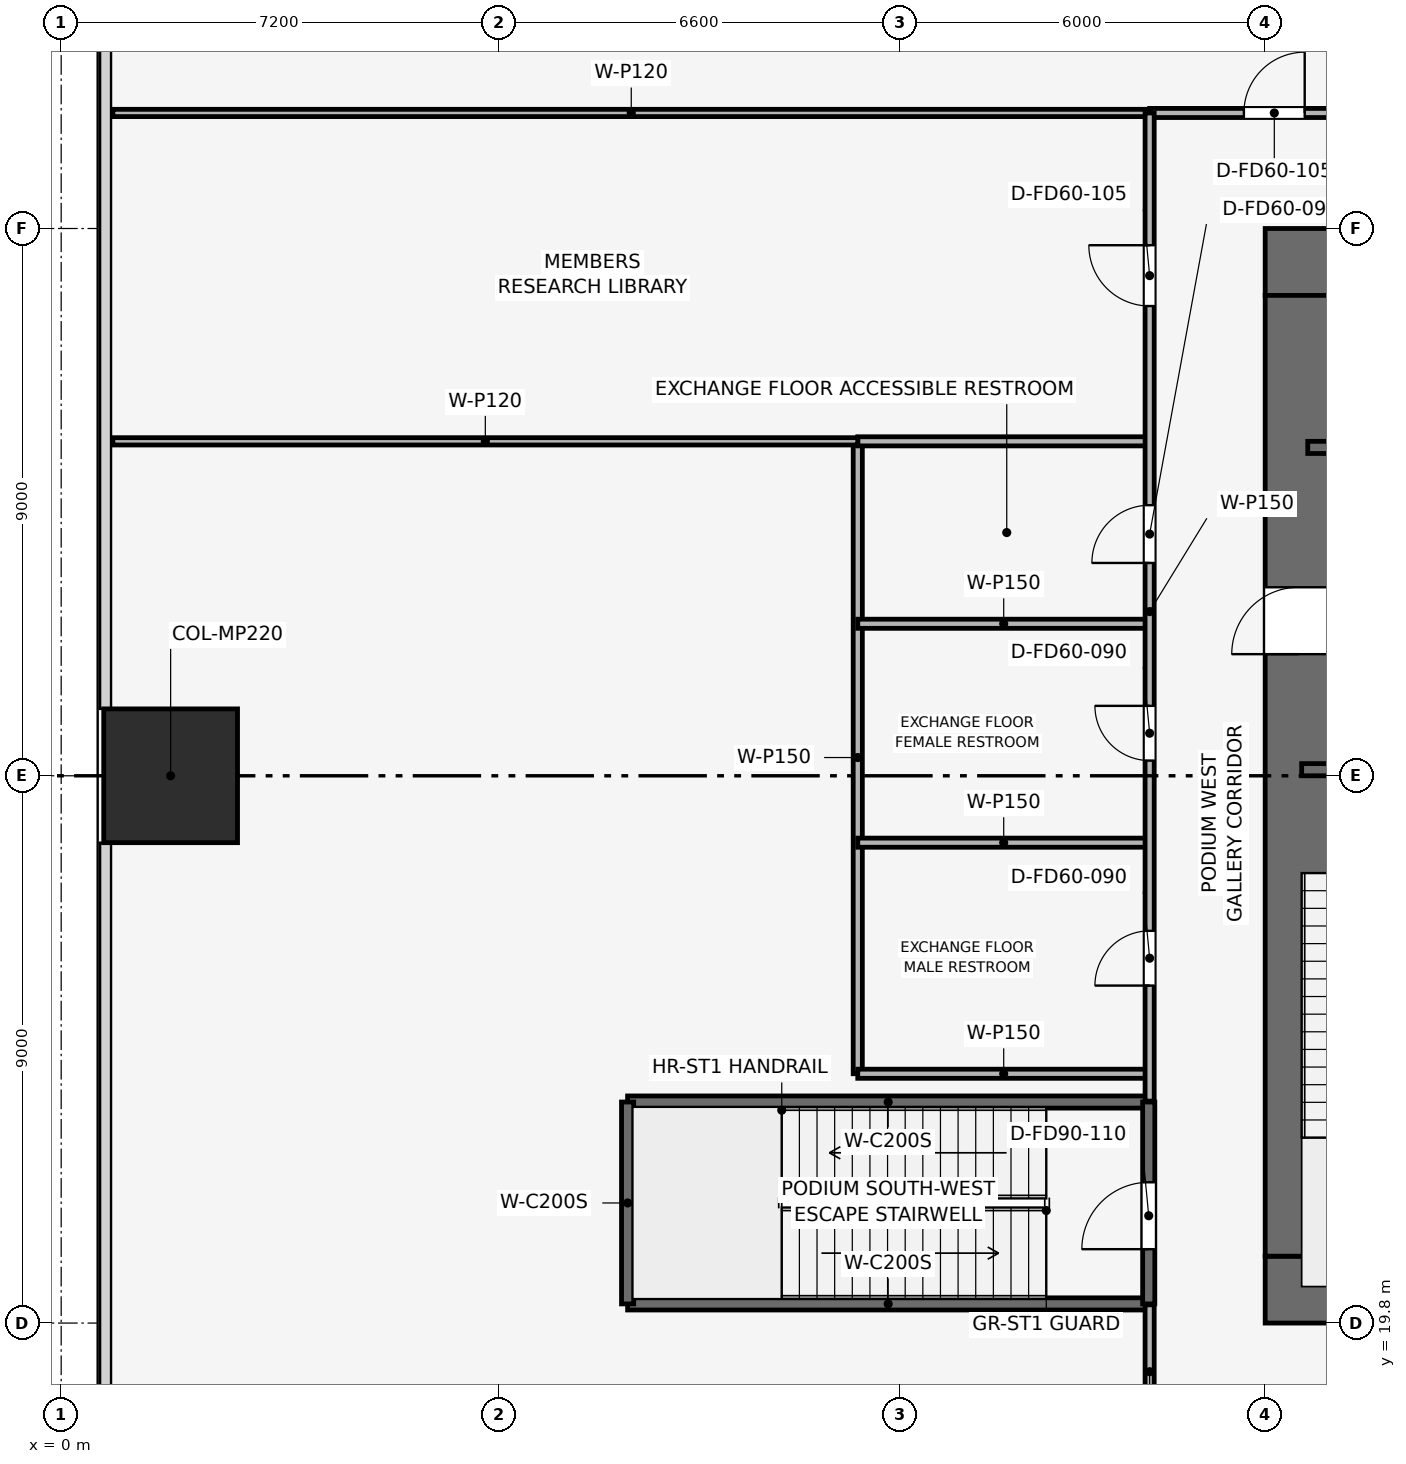
"""IFC4 building model, lengths in metres.
Left out: names, types, materials, properties, quantities, classifications, styles, units other than length and angle.
Written with IfcOpenShell. Run it as: python <this file> out.ifc"""

import sys

from ifc_helpers import new_model, si_unit, direction, frame, frame_2d, origin, origin_2d, place, context, subcontext, project, spatial, rectangle, extrude, element, fill, save


model = new_model("IFC4")
c1 = context("Model", 3, precision=1e-05, world=origin(), true_north=direction((0.0, 1.0)))
c2 = subcontext(c1, "Body", "Model", "MODEL_VIEW")
j1 = project(units=[si_unit("LENGTHUNIT", "METRE"), si_unit("PLANEANGLEUNIT", "RADIAN")], contexts=[c1])
p1 = place(None, origin())
s1 = spatial("IfcSite", under=j1, at=p1, CompositionType="ELEMENT")
p2 = place(p1, origin())
s2 = spatial("IfcBuilding", under=s1, at=p2, CompositionType="ELEMENT")
p3 = place(p2, frame((0.0, 0.0, 8.4)))
s3 = spatial("IfcBuildingStorey", under=s2, at=p3, CompositionType="ELEMENT", Elevation=8.4)
p4 = place(p3, frame((19.8, 20.35, 0.0), z_axis=(0.0, 0.0, 1.0), x_axis=(1.0, 0.0, 0.0)))
e1 = element("IfcWall", 1, at=p4, inside=s3, PredefinedType="SHEAR", context=c2, shape_type="SweptSolid", body=[
    extrude(rectangle(XDim=18.0, YDim=1.1, at=frame_2d((9.0, 0.0))), origin(), (0.0, 0.0, 1.0), 5.4),
])
p5 = place(p4, frame((8.4, 0.0, 0.0)))
e2 = element("IfcOpeningElement", 2, at=p5, cuts=e1, PredefinedType="OPENING", context=c2, shape_type="SweptSolid", body=[
    extrude(rectangle(XDim=1.2, YDim=2.2, at=frame_2d((0.6, 1.1))), frame((0.0, 0.56, 0.0), z_axis=(0.0, -1.0, 0.0), x_axis=(1.0, 0.0, 0.0)), (0.0, 0.0, 1.0), 1.12),
])
p6 = place(p3, frame((19.8, 37.25, 0.0), z_axis=(0.0, 0.0, 1.0), x_axis=(1.0, 0.0, 0.0)))
e3 = element("IfcWall", 3, at=p6, inside=s3, PredefinedType="SHEAR", context=c2, shape_type="SweptSolid", body=[
    extrude(rectangle(XDim=18.0, YDim=1.1, at=frame_2d((9.0, 0.0))), origin(), (0.0, 0.0, 1.0), 5.4),
])
p7 = place(p6, frame((7.05, 0.0, 0.0)))
e4 = element("IfcOpeningElement", 4, at=p7, cuts=e3, PredefinedType="OPENING", context=c2, shape_type="SweptSolid", body=[
    extrude(rectangle(XDim=1.1, YDim=2.15, at=frame_2d((0.55, 1.075))), frame((0.0, 0.56, 0.0), z_axis=(0.0, -1.0, 0.0), x_axis=(1.0, 0.0, 0.0)), (0.0, 0.0, 1.0), 1.12),
])
p8 = place(p3, frame((20.35, 20.9, 0.0), z_axis=(0.0, 0.0, 1.0), x_axis=(0.0, 1.0, 0.0)))
e5 = element("IfcWall", 5, at=p8, inside=s3, PredefinedType="SHEAR", context=c2, shape_type="SweptSolid", body=[
    extrude(rectangle(XDim=15.8, YDim=1.1, at=frame_2d((7.9, 0.0))), origin(), (0.0, 0.0, 1.0), 5.4),
])
p9 = place(p8, frame((9.9, 0.0, 0.0)))
e6 = element("IfcOpeningElement", 6, at=p9, cuts=e5, PredefinedType="OPENING", context=c2, shape_type="SweptSolid", body=[
    extrude(rectangle(XDim=1.1, YDim=2.15, at=frame_2d((0.55, 1.075))), frame((0.0, 0.56, 0.0), z_axis=(0.0, -1.0, 0.0), x_axis=(1.0, 0.0, 0.0)), (0.0, 0.0, 1.0), 1.12),
])
p10 = place(p3, frame((1.8, 28.8, 0.002), z_axis=(0.0, 0.0, 1.0), x_axis=(1.0, 0.0, 0.0)))
e7 = element("IfcColumn", 7, at=p10, inside=s3, PredefinedType="PILASTER", context=c2, shape_type="SweptSolid", body=[
    extrude(rectangle(XDim=2.2, YDim=2.2, at=origin_2d()), origin(), (0.0, 0.0, 1.0), 5.396),
])
p11 = place(p3, frame((20.4, 28.9, 0.0), z_axis=(0.0, 0.0, 1.0), x_axis=(1.0, 0.0, 0.0)))
e8 = element("IfcWall", 8, at=p11, inside=s3, PredefinedType="SHEAR", context=c2, shape_type="SweptSolid", body=[
    extrude(rectangle(XDim=3.15, YDim=0.2, at=frame_2d((1.575, 0.0))), origin(), (0.0, 0.0, 1.0), 5.05),
])
p12 = place(p11, frame((0.8, 0.0, 0.0)))
e9 = element("IfcOpeningElement", 9, at=p12, cuts=e8, PredefinedType="OPENING", context=c2, shape_type="SweptSolid", body=[
    extrude(rectangle(XDim=1.0, YDim=2.1, at=frame_2d((0.5, 1.05))), frame((0.0, 0.11, 0.0), z_axis=(0.0, -1.0, 0.0), x_axis=(1.0, 0.0, 0.0)), (0.0, 0.0, 1.0), 0.22),
])
p13 = place(p3, frame((20.5, 34.2, 0.0), z_axis=(0.0, 0.0, 1.0), x_axis=(1.0, 0.0, 0.0)))
e10 = element("IfcWall", 10, at=p13, inside=s3, PredefinedType="SHEAR", context=c2, shape_type="SweptSolid", body=[
    extrude(rectangle(XDim=3.05, YDim=0.2, at=frame_2d((1.525, 0.0))), origin(), (0.0, 0.0, 1.0), 5.05),
])
p14 = place(p13, frame((0.75, 0.0, 0.0)))
e11 = element("IfcOpeningElement", 11, at=p14, cuts=e10, PredefinedType="OPENING", context=c2, shape_type="SweptSolid", body=[
    extrude(rectangle(XDim=1.1, YDim=2.15, at=frame_2d((0.55, 1.075))), frame((0.0, 0.11, 0.0), z_axis=(0.0, -1.0, 0.0), x_axis=(1.0, 0.0, 0.0)), (0.0, 0.0, 1.0), 0.22),
])
for number, where, z_axis, x_axis in (
    (12, (9.315, 20.115, 0.0), (0.0, 0.0, 1.0), (1.0, 0.0, 0.0)),
    (13, (9.315, 23.435, 0.0), (0.0, 0.0, 1.0), (1.0, 0.0, 0.0)),
):
    element("IfcWall", number, at=place(p3, frame(where, z_axis=z_axis, x_axis=x_axis)), inside=s3, PredefinedType="SHEAR", context=c2, shape_type="SweptSolid", body=[
        extrude(rectangle(XDim=8.57, YDim=0.2, at=frame_2d((4.285, 0.0))), origin(), (0.0, 0.0, 1.0), 5.398),
    ])
p15 = place(p3, frame((9.315, 20.115, 0.0), z_axis=(0.0, 0.0, 1.0), x_axis=(0.0, 1.0, 0.0)))
e14 = element("IfcWall", 14, at=p15, inside=s3, PredefinedType="SHEAR", context=c2, shape_type="SweptSolid", body=[
    extrude(rectangle(XDim=3.32, YDim=0.2, at=frame_2d((1.66, 0.0))), origin(), (0.0, 0.0, 1.0), 5.398),
])
p16 = place(p3, frame((17.885, 20.115, 0.0), z_axis=(0.0, 0.0, 1.0), x_axis=(0.0, 1.0, 0.0)))
e15 = element("IfcWall", 15, at=p16, inside=s3, PredefinedType="SHEAR", context=c2, shape_type="SweptSolid", body=[
    extrude(rectangle(XDim=3.32, YDim=0.2, at=frame_2d((1.66, 0.0))), origin(), (0.0, 0.0, 1.0), 5.398),
])
p17 = place(p16, frame((0.9, 0.0, 0.0)))
e16 = element("IfcOpeningElement", 16, at=p17, cuts=e15, PredefinedType="OPENING", context=c2, shape_type="SweptSolid", body=[
    extrude(rectangle(XDim=1.1, YDim=2.15, at=frame_2d((0.55, 1.075))), frame((0.0, 0.11, 0.0), z_axis=(0.0, -1.0, 0.0), x_axis=(1.0, 0.0, 0.0)), (0.0, 0.0, 1.0), 0.22),
])
p18 = place(p3, frame((13.1, 23.9, 0.0), z_axis=(0.0, 0.0, 1.0), x_axis=(0.0, 1.0, 0.0)))
e17 = element("IfcWall", 17, at=p18, inside=s3, PredefinedType="PARTITIONING", context=c2, shape_type="SweptSolid", body=[
    extrude(rectangle(XDim=10.4, YDim=0.15, at=frame_2d((5.2, 0.0))), origin(), (0.0, 0.0, 1.0), 4.135),
])
for number, where, z_axis, x_axis in (
    (18, (13.1, 23.9, 0.0), (0.0, 0.0, 1.0), (1.0, 0.0, 0.0)),
    (19, (13.1, 34.3, 0.0), (0.0, 0.0, 1.0), (1.0, 0.0, 0.0)),
    (20, (13.1, 27.7, 0.0), (0.0, 0.0, 1.0), (1.0, 0.0, 0.0)),
    (21, (13.1, 31.3, 0.0), (0.0, 0.0, 1.0), (1.0, 0.0, 0.0)),
):
    element("IfcWall", number, at=place(p3, frame(where, z_axis=z_axis, x_axis=x_axis)), inside=s3, PredefinedType="PARTITIONING", context=c2, shape_type="SweptSolid", body=[
        extrude(rectangle(XDim=4.8, YDim=0.15, at=frame_2d((2.4, 0.0))), origin(), (0.0, 0.0, 1.0), 5.05),
    ])
p19 = place(p3, frame((0.85, 34.3, 0.0), z_axis=(0.0, 0.0, 1.0), x_axis=(1.0, 0.0, 0.0)))
e22 = element("IfcWall", 22, at=p19, inside=s3, PredefinedType="PARTITIONING", context=c2, shape_type="SweptSolid", body=[
    extrude(rectangle(XDim=12.25, YDim=0.12, at=frame_2d((6.125, 0.0))), origin(), (0.0, 0.0, 1.0), 4.035),
])
p20 = place(p3, frame((0.85, 39.7, 0.0), z_axis=(0.0, 0.0, 1.0), x_axis=(1.0, 0.0, 0.0)))
e23 = element("IfcWall", 23, at=p20, inside=s3, PredefinedType="PARTITIONING", context=c2, shape_type="SweptSolid", body=[
    extrude(rectangle(XDim=17.05, YDim=0.12, at=frame_2d((8.525, 0.0))), origin(), (0.0, 0.0, 1.0), 4.035),
])
p21 = place(p3, frame((17.9, 39.7, 0.0), z_axis=(0.0, 0.0, 1.0), x_axis=(1.0, 0.0, 0.0)))
e24 = element("IfcWall", 24, at=p21, inside=s3, PredefinedType="PARTITIONING", context=c2, shape_type="SweptSolid", body=[
    extrude(rectangle(XDim=21.8, YDim=0.15, at=frame_2d((10.9, 0.0))), origin(), (0.0, 0.0, 1.0), 4.135),
])
p22 = place(p21, frame((1.55, 0.0, 0.0)))
e25 = element("IfcOpeningElement", 25, at=p22, cuts=e24, PredefinedType="OPENING", context=c2, shape_type="SweptSolid", body=[
    extrude(rectangle(XDim=1.0, YDim=2.15, at=frame_2d((0.5, 1.075))), frame((0.0, 0.085, 0.0), z_axis=(0.0, -1.0, 0.0), x_axis=(1.0, 0.0, 0.0)), (0.0, 0.0, 1.0), 0.17),
])
p23 = place(p21, frame((10.4, 0.0, 0.0)))
e26 = element("IfcOpeningElement", 26, at=p23, cuts=e24, PredefinedType="OPENING", context=c2, shape_type="SweptSolid", body=[
    extrude(rectangle(XDim=1.0, YDim=2.15, at=frame_2d((0.5, 1.075))), frame((0.0, 0.085, 0.0), z_axis=(0.0, -1.0, 0.0), x_axis=(1.0, 0.0, 0.0)), (0.0, 0.0, 1.0), 0.17),
])
p24 = place(p21, frame((19.25, 0.0, 0.0)))
e27 = element("IfcOpeningElement", 27, at=p24, cuts=e24, PredefinedType="OPENING", context=c2, shape_type="SweptSolid", body=[
    extrude(rectangle(XDim=1.0, YDim=2.15, at=frame_2d((0.5, 1.075))), frame((0.0, 0.085, 0.0), z_axis=(0.0, -1.0, 0.0), x_axis=(1.0, 0.0, 0.0)), (0.0, 0.0, 1.0), 0.17),
])
p25 = place(p3, frame((17.9, 17.9, 0.0), z_axis=(0.0, 0.0, 1.0), x_axis=(0.0, 1.0, 0.0)))
e28 = element("IfcWall", 28, at=p25, inside=s3, PredefinedType="PARTITIONING", context=c2, shape_type="SweptSolid", body=[
    extrude(rectangle(XDim=2.2, YDim=0.15, at=frame_2d((1.1, 0.0))), origin(), (0.0, 0.0, 1.0), 5.05),
])
p26 = place(p3, frame((17.9, 23.45, 0.0), z_axis=(0.0, 0.0, 1.0), x_axis=(0.0, 1.0, 0.0)))
e29 = element("IfcWall", 29, at=p26, inside=s3, PredefinedType="PARTITIONING", context=c2, shape_type="SweptSolid", body=[
    extrude(rectangle(XDim=16.25, YDim=0.15, at=frame_2d((8.125, 0.0))), origin(), (0.0, 0.0, 1.0), 4.135),
])
p27 = place(p26, frame((1.9, 0.0, 0.0)))
e30 = element("IfcOpeningElement", 30, at=p27, cuts=e29, PredefinedType="OPENING", context=c2, shape_type="SweptSolid", body=[
    extrude(rectangle(XDim=0.9, YDim=2.1, at=frame_2d((0.45, 1.05))), frame((0.0, 0.085, 0.0), z_axis=(0.0, -1.0, 0.0), x_axis=(1.0, 0.0, 0.0)), (0.0, 0.0, 1.0), 0.17),
])
p28 = place(p26, frame((5.6, 0.0, 0.0)))
e31 = element("IfcOpeningElement", 31, at=p28, cuts=e29, PredefinedType="OPENING", context=c2, shape_type="SweptSolid", body=[
    extrude(rectangle(XDim=0.9, YDim=2.1, at=frame_2d((0.45, 1.05))), frame((0.0, 0.085, 0.0), z_axis=(0.0, -1.0, 0.0), x_axis=(1.0, 0.0, 0.0)), (0.0, 0.0, 1.0), 0.17),
])
p29 = place(p26, frame((8.85, 0.0, 0.0)))
e32 = element("IfcOpeningElement", 32, at=p29, cuts=e29, PredefinedType="OPENING", context=c2, shape_type="SweptSolid", body=[
    extrude(rectangle(XDim=0.95, YDim=2.1, at=frame_2d((0.475, 1.05))), frame((0.0, 0.085, 0.0), z_axis=(0.0, -1.0, 0.0), x_axis=(1.0, 0.0, 0.0)), (0.0, 0.0, 1.0), 0.17),
])
p30 = place(p26, frame((13.075, 0.0, 0.0)))
e33 = element("IfcOpeningElement", 33, at=p30, cuts=e29, PredefinedType="OPENING", context=c2, shape_type="SweptSolid", body=[
    extrude(rectangle(XDim=1.0, YDim=2.15, at=frame_2d((0.5, 1.075))), frame((0.0, 0.085, 0.0), z_axis=(0.0, -1.0, 0.0), x_axis=(1.0, 0.0, 0.0)), (0.0, 0.0, 1.0), 0.17),
])
p31 = place(p17, origin())
e34 = element("IfcDoor", 34, at=p31, inside=s3, OperationType="SINGLE_SWING_LEFT", PredefinedType="DOOR", context=c2, shape_type="SweptSolid", body=[
    extrude(rectangle(XDim=1.1, YDim=2.15, at=frame_2d((0.55, 1.075))), frame((0.0, 0.025, 0.0), z_axis=(0.0, -1.0, 0.0), x_axis=(1.0, 0.0, 0.0)), (0.0, 0.0, 1.0), 0.05),
])
fill(e16, e34)
p32 = place(p22, origin())
e35 = element("IfcDoor", 35, at=p32, inside=s3, OperationType="SINGLE_SWING_RIGHT", PredefinedType="DOOR", context=c2, shape_type="SweptSolid", body=[
    extrude(rectangle(XDim=1.0, YDim=2.15, at=frame_2d((0.5, 1.075))), frame((0.0, 0.025, 0.0), z_axis=(0.0, -1.0, 0.0), x_axis=(1.0, 0.0, 0.0)), (0.0, 0.0, 1.0), 0.05),
])
fill(e25, e35)
p33 = place(p27, origin())
e36 = element("IfcDoor", 36, at=p33, inside=s3, OperationType="SINGLE_SWING_LEFT", PredefinedType="DOOR", context=c2, shape_type="SweptSolid", body=[
    extrude(rectangle(XDim=0.9, YDim=2.1, at=frame_2d((0.45, 1.05))), frame((0.0, 0.025, 0.0), z_axis=(0.0, -1.0, 0.0), x_axis=(1.0, 0.0, 0.0)), (0.0, 0.0, 1.0), 0.05),
])
fill(e30, e36)
p34 = place(p28, origin())
e37 = element("IfcDoor", 37, at=p34, inside=s3, OperationType="SINGLE_SWING_RIGHT", PredefinedType="DOOR", context=c2, shape_type="SweptSolid", body=[
    extrude(rectangle(XDim=0.9, YDim=2.1, at=frame_2d((0.45, 1.05))), frame((0.0, 0.025, 0.0), z_axis=(0.0, -1.0, 0.0), x_axis=(1.0, 0.0, 0.0)), (0.0, 0.0, 1.0), 0.05),
])
fill(e31, e37)
p35 = place(p29, origin())
e38 = element("IfcDoor", 38, at=p35, inside=s3, OperationType="SINGLE_SWING_LEFT", PredefinedType="DOOR", context=c2, shape_type="SweptSolid", body=[
    extrude(rectangle(XDim=0.95, YDim=2.1, at=frame_2d((0.475, 1.05))), frame((0.0, 0.025, 0.0), z_axis=(0.0, -1.0, 0.0), x_axis=(1.0, 0.0, 0.0)), (0.0, 0.0, 1.0), 0.05),
])
fill(e32, e38)
p36 = place(p30, origin())
e39 = element("IfcDoor", 39, at=p36, inside=s3, OperationType="SINGLE_SWING_RIGHT", PredefinedType="DOOR", context=c2, shape_type="SweptSolid", body=[
    extrude(rectangle(XDim=1.0, YDim=2.15, at=frame_2d((0.5, 1.075))), frame((0.0, 0.025, 0.0), z_axis=(0.0, -1.0, 0.0), x_axis=(1.0, 0.0, 0.0)), (0.0, 0.0, 1.0), 0.05),
])
fill(e33, e39)
p37 = place(p9, origin())
e40 = element("IfcDoor", 40, at=p37, inside=s3, OperationType="SINGLE_SWING_LEFT", PredefinedType="DOOR", context=c2, shape_type="SweptSolid", body=[
    extrude(rectangle(XDim=1.1, YDim=2.15, at=frame_2d((0.55, 1.075))), frame((0.0, 0.025, 0.0), z_axis=(0.0, -1.0, 0.0), x_axis=(1.0, 0.0, 0.0)), (0.0, 0.0, 1.0), 0.05),
])
fill(e6, e40)
save(model, sys.argv[1])
